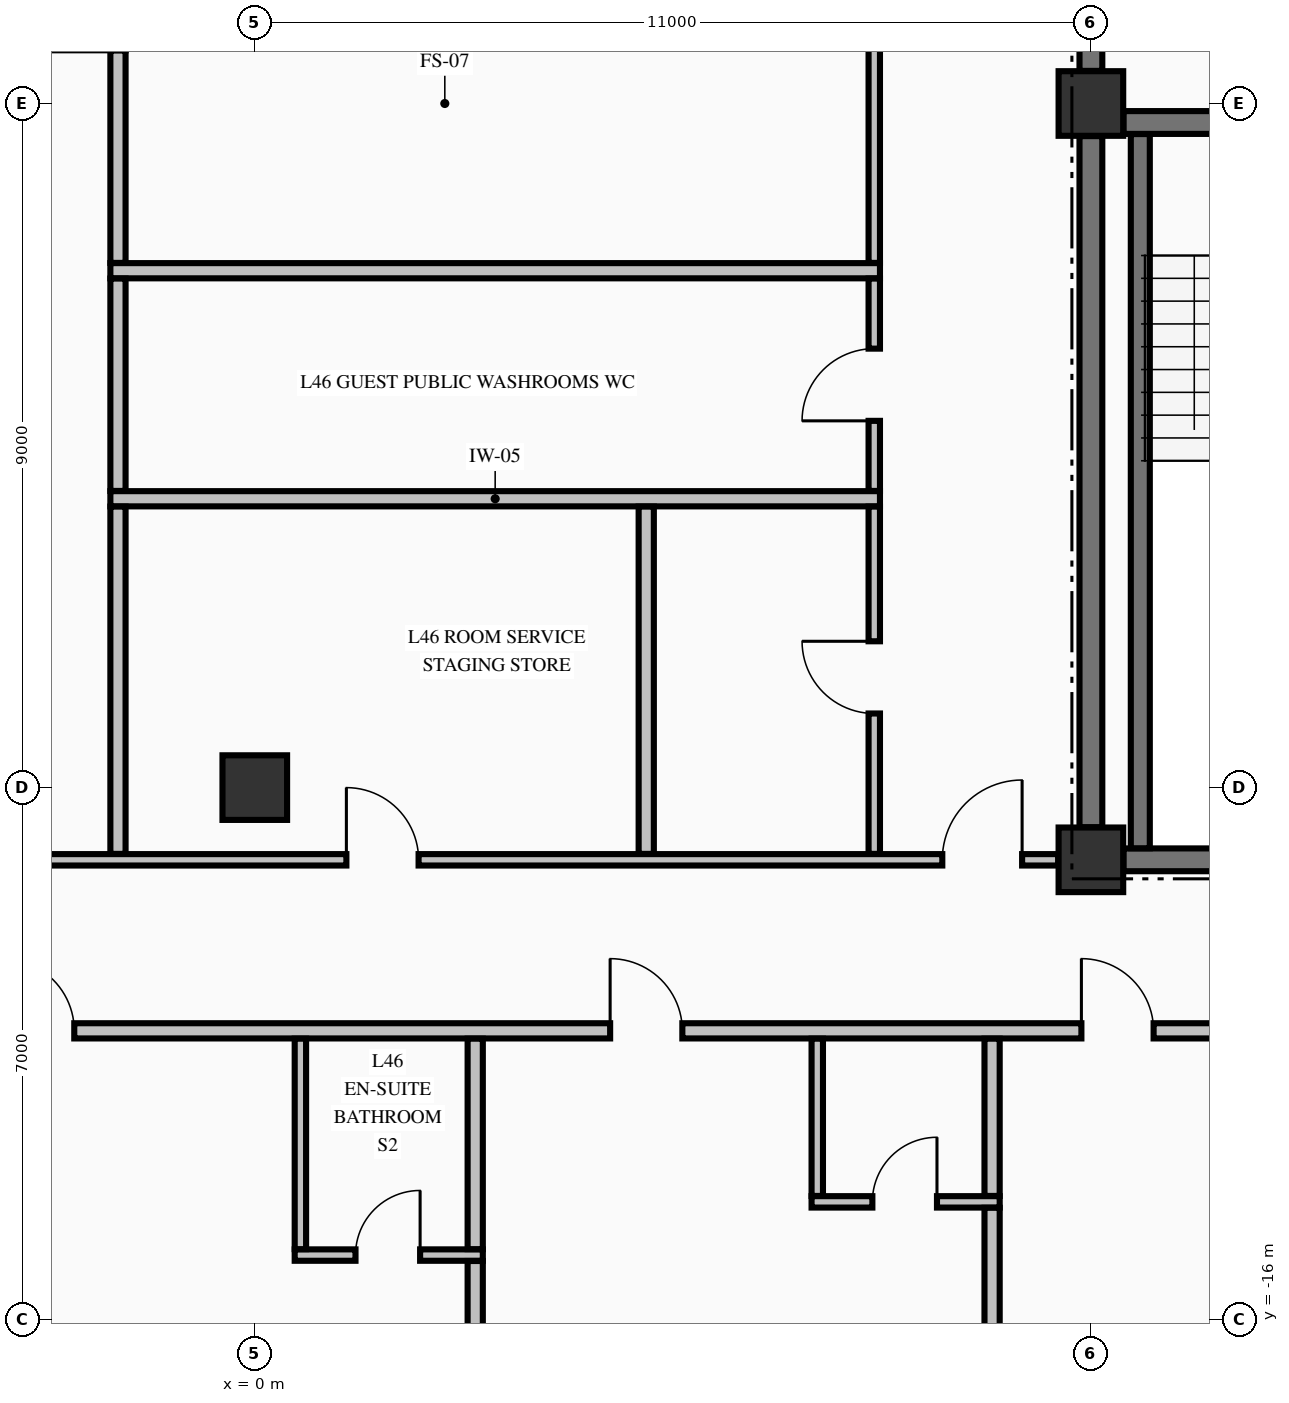
"""IFC4 building model, lengths in metres.
Left out: names, types, materials, properties, quantities, classifications, styles, units other than length and angle.
Written with IfcOpenShell. Run it as: python <this file> out.ifc"""

import sys

from ifc_helpers import new_model, si_unit, direction, frame, frame_2d, origin, origin_2d, place, context, subcontext, project, spatial, rectangle, extrude, element, fill, save


model = new_model("IFC4")
c1 = context("Model", 3, precision=1e-05, world=origin(), true_north=direction((0.0, 1.0)))
c2 = subcontext(c1, "Body", "Model", "MODEL_VIEW")
j1 = project(units=[si_unit("LENGTHUNIT", "METRE"), si_unit("PLANEANGLEUNIT", "RADIAN")], contexts=[c1])
p1 = place(None, origin())
s1 = spatial("IfcSite", under=j1, at=p1, CompositionType="ELEMENT")
p2 = place(p1, origin())
s2 = spatial("IfcBuilding", under=s1, at=p2, CompositionType="ELEMENT")
p3 = place(p2, frame((0.0, 0.0, 179.66)))
s3 = spatial("IfcBuildingStorey", under=s2, at=p3, CompositionType="ELEMENT", Elevation=179.66)
for number, where, z_axis, x_axis in (
    (1, (11.0, -9.95, -0.25), (0.0, 0.0, 1.0), (1.0, 0.0, 0.0)),
    (2, (11.0, 0.0, -0.25), (0.0, 0.0, 1.0), (1.0, 0.0, 0.0)),
    (3, (0.0, -9.0, -0.25), (0.0, 0.0, 1.0), (1.0, 0.0, 0.0)),
):
    element("IfcColumn", number, at=place(p3, frame(where, z_axis=z_axis, x_axis=x_axis)), inside=s3, PredefinedType="COLUMN", context=c2, shape_type="SweptSolid", body=[
        extrude(rectangle(XDim=0.85, YDim=0.85, at=origin_2d()), origin(), (0.0, 0.0, 1.0), 3.4),
    ])
p4 = place(p3, frame((11.429, -9.95, 0.0), z_axis=(0.0, 0.0, 1.0), x_axis=(1.0, 0.0, 0.0)))
e4 = element("IfcWall", 4, at=p4, inside=s3, PredefinedType="SHEAR", context=c2, shape_type="SweptSolid", body=[
    extrude(rectangle(XDim=3.271, YDim=0.3, at=frame_2d((1.635, 0.0))), origin(), (0.0, 0.0, 1.0), 3.15),
])
p5 = place(p3, frame((11.429, -0.25, 0.0), z_axis=(0.0, 0.0, 1.0), x_axis=(1.0, 0.0, 0.0)))
e5 = element("IfcWall", 5, at=p5, inside=s3, PredefinedType="SHEAR", context=c2, shape_type="SweptSolid", body=[
    extrude(rectangle(XDim=3.446, YDim=0.3, at=frame_2d((1.723, 0.0))), origin(), (0.0, 0.0, 1.0), 3.15),
])
p6 = place(p5, frame((1.171, 0.0, 0.0)))
e6 = element("IfcOpeningElement", 6, at=p6, cuts=e5, PredefinedType="OPENING", context=c2, shape_type="SweptSolid", body=[
    extrude(rectangle(XDim=1.1, YDim=2.15, at=frame_2d((0.55, 1.075))), frame((0.0, 0.16, 0.0), z_axis=(0.0, -1.0, 0.0), x_axis=(1.0, 0.0, 0.0)), (0.0, 0.0, 1.0), 0.32),
])
p7 = place(p3, frame((0.525, -15.15, 0.0), z_axis=(0.0, 0.0, 1.0), x_axis=(1.0, 0.0, 0.0)))
e7 = element("IfcWall", 7, at=p7, inside=s3, PredefinedType="PARTITIONING", context=c2, shape_type="SweptSolid", body=[
    extrude(rectangle(XDim=2.475, YDim=0.15, at=frame_2d((1.238, 0.0))), origin(), (0.0, 0.0, 1.0), 3.15),
])
p8 = place(p7, frame((0.8, 0.0, 0.0)))
e8 = element("IfcOpeningElement", 8, at=p8, cuts=e7, PredefinedType="OPENING", context=c2, shape_type="SweptSolid", body=[
    extrude(rectangle(XDim=0.85, YDim=2.1, at=frame_2d((0.425, 1.05))), frame((0.0, 0.085, 0.0), z_axis=(0.0, -1.0, 0.0), x_axis=(1.0, 0.0, 0.0)), (0.0, 0.0, 1.0), 0.17),
])
p9 = place(p3, frame((7.325, -14.45, 0.0), z_axis=(0.0, 0.0, 1.0), x_axis=(1.0, 0.0, 0.0)))
e9 = element("IfcWall", 9, at=p9, inside=s3, PredefinedType="PARTITIONING", context=c2, shape_type="SweptSolid", body=[
    extrude(rectangle(XDim=2.475, YDim=0.15, at=frame_2d((1.238, 0.0))), origin(), (0.0, 0.0, 1.0), 3.15),
])
p10 = place(p9, frame((0.8, 0.0, 0.0)))
e10 = element("IfcOpeningElement", 10, at=p10, cuts=e9, PredefinedType="OPENING", context=c2, shape_type="SweptSolid", body=[
    extrude(rectangle(XDim=0.85, YDim=2.1, at=frame_2d((0.425, 1.05))), frame((0.0, 0.085, 0.0), z_axis=(0.0, -1.0, 0.0), x_axis=(1.0, 0.0, 0.0)), (0.0, 0.0, 1.0), 0.17),
])
p11 = place(p3, frame((-17.1, -12.2, 0.0), z_axis=(0.0, 0.0, 1.0), x_axis=(1.0, 0.0, 0.0)))
e11 = element("IfcWall", 11, at=p11, inside=s3, PredefinedType="PARTITIONING", context=c2, shape_type="SweptSolid", body=[
    extrude(rectangle(XDim=39.2, YDim=0.2, at=frame_2d((19.6, 0.0))), origin(), (0.0, 0.0, 1.0), 3.15),
])
p12 = place(p11, frame((3.825, 0.0, 0.0)))
e12 = element("IfcOpeningElement", 12, at=p12, cuts=e11, PredefinedType="OPENING", context=c2, shape_type="SweptSolid", body=[
    extrude(rectangle(XDim=0.95, YDim=2.15, at=frame_2d((0.475, 1.075))), frame((0.0, 0.11, 0.0), z_axis=(0.0, -1.0, 0.0), x_axis=(1.0, 0.0, 0.0)), (0.0, 0.0, 1.0), 0.22),
])
p13 = place(p11, frame((13.775, 0.0, 0.0)))
e13 = element("IfcOpeningElement", 13, at=p13, cuts=e11, PredefinedType="OPENING", context=c2, shape_type="SweptSolid", body=[
    extrude(rectangle(XDim=0.95, YDim=2.15, at=frame_2d((0.475, 1.075))), frame((0.0, 0.11, 0.0), z_axis=(0.0, -1.0, 0.0), x_axis=(1.0, 0.0, 0.0)), (0.0, 0.0, 1.0), 0.22),
])
p14 = place(p11, frame((21.775, 0.0, 0.0)))
e14 = element("IfcOpeningElement", 14, at=p14, cuts=e11, PredefinedType="OPENING", context=c2, shape_type="SweptSolid", body=[
    extrude(rectangle(XDim=0.95, YDim=2.15, at=frame_2d((0.475, 1.075))), frame((0.0, 0.11, 0.0), z_axis=(0.0, -1.0, 0.0), x_axis=(1.0, 0.0, 0.0)), (0.0, 0.0, 1.0), 0.22),
])
p15 = place(p11, frame((27.975, 0.0, 0.0)))
e15 = element("IfcOpeningElement", 15, at=p15, cuts=e11, PredefinedType="OPENING", context=c2, shape_type="SweptSolid", body=[
    extrude(rectangle(XDim=0.95, YDim=2.15, at=frame_2d((0.475, 1.075))), frame((0.0, 0.11, 0.0), z_axis=(0.0, -1.0, 0.0), x_axis=(1.0, 0.0, 0.0)), (0.0, 0.0, 1.0), 0.22),
])
p16 = place(p11, frame((34.325, 0.0, 0.0)))
e16 = element("IfcOpeningElement", 16, at=p16, cuts=e11, PredefinedType="OPENING", context=c2, shape_type="SweptSolid", body=[
    extrude(rectangle(XDim=0.95, YDim=2.15, at=frame_2d((0.475, 1.075))), frame((0.0, 0.11, 0.0), z_axis=(0.0, -1.0, 0.0), x_axis=(1.0, 0.0, 0.0)), (0.0, 0.0, 1.0), 0.22),
])
p17 = place(p3, frame((-10.569, -9.95, 0.0), z_axis=(0.0, 0.0, 1.0), x_axis=(1.0, 0.0, 0.0)))
e17 = element("IfcWall", 17, at=p17, inside=s3, PredefinedType="PARTITIONING", context=c2, shape_type="SweptSolid", body=[
    extrude(rectangle(XDim=21.138, YDim=0.15, at=frame_2d((10.569, 0.0))), origin(), (0.0, 0.0, 1.0), 3.15),
])
p18 = place(p17, frame((0.474, 0.0, 0.0)))
e18 = element("IfcOpeningElement", 18, at=p18, cuts=e17, PredefinedType="OPENING", context=c2, shape_type="SweptSolid", body=[
    extrude(rectangle(XDim=1.05, YDim=2.15, at=frame_2d((0.525, 1.075))), frame((0.0, 0.085, 0.0), z_axis=(0.0, -1.0, 0.0), x_axis=(1.0, 0.0, 0.0)), (0.0, 0.0, 1.0), 0.17),
])
p19 = place(p17, frame((19.614, 0.0, 0.0)))
e19 = element("IfcOpeningElement", 19, at=p19, cuts=e17, PredefinedType="OPENING", context=c2, shape_type="SweptSolid", body=[
    extrude(rectangle(XDim=1.05, YDim=2.15, at=frame_2d((0.525, 1.075))), frame((0.0, 0.085, 0.0), z_axis=(0.0, -1.0, 0.0), x_axis=(1.0, 0.0, 0.0)), (0.0, 0.0, 1.0), 0.17),
])
p20 = place(p17, frame((11.774, 0.0, 0.0)))
e20 = element("IfcOpeningElement", 20, at=p20, cuts=e17, PredefinedType="OPENING", context=c2, shape_type="SweptSolid", body=[
    extrude(rectangle(XDim=0.95, YDim=2.15, at=frame_2d((0.475, 1.075))), frame((0.0, 0.085, 0.0), z_axis=(0.0, -1.0, 0.0), x_axis=(1.0, 0.0, 0.0)), (0.0, 0.0, 1.0), 0.17),
])
for number, where, z_axis, x_axis in (
    (21, (-1.9, -5.2, 0.0), (0.0, 0.0, 1.0), (1.0, 0.0, 0.0)),
    (22, (-1.9, -2.2, 0.0), (0.0, 0.0, 1.0), (1.0, 0.0, 0.0)),
):
    element("IfcWall", number, at=place(p3, frame(where, z_axis=z_axis, x_axis=x_axis)), inside=s3, PredefinedType="PARTITIONING", context=c2, shape_type="SweptSolid", body=[
        extrude(rectangle(XDim=10.125, YDim=0.2, at=frame_2d((5.062, 0.0))), origin(), (0.0, 0.0, 1.0), 3.15),
    ])
p21 = place(p3, frame((11.0, -9.521, 0.0), z_axis=(0.0, 0.0, 1.0), x_axis=(0.0, 1.0, 0.0)))
e23 = element("IfcWall", 23, at=p21, inside=s3, PredefinedType="SHEAR", context=c2, shape_type="SweptSolid", body=[
    extrude(rectangle(XDim=9.092, YDim=0.3, at=frame_2d((4.546, 0.0))), origin(), (0.0, 0.0, 1.0), 3.15),
])
p22 = place(p3, frame((11.0, 0.429, 0.0), z_axis=(0.0, 0.0, 1.0), x_axis=(0.0, 1.0, 0.0)))
e24 = element("IfcWall", 24, at=p22, inside=s3, PredefinedType="SHEAR", context=c2, shape_type="SweptSolid", body=[
    extrude(rectangle(XDim=2.319, YDim=0.3, at=frame_2d((1.16, 0.0))), origin(), (0.0, 0.0, 1.0), 3.15),
])
p23 = place(p22, frame((0.671, 0.0, 0.0)))
e25 = element("IfcOpeningElement", 25, at=p23, cuts=e24, PredefinedType="OPENING", context=c2, shape_type="SweptSolid", body=[
    extrude(rectangle(XDim=1.1, YDim=2.15, at=frame_2d((0.55, 1.075))), frame((0.0, 0.16, 0.0), z_axis=(0.0, -1.0, 0.0), x_axis=(1.0, 0.0, 0.0)), (0.0, 0.0, 1.0), 0.32),
])
p24 = place(p3, frame((11.65, -9.798, 0.0), z_axis=(0.0, 0.0, 1.0), x_axis=(0.0, 1.0, 0.0)))
e26 = element("IfcWall", 26, at=p24, inside=s3, PredefinedType="SOLIDWALL", context=c2, shape_type="SweptSolid", body=[
    extrude(rectangle(XDim=9.396, YDim=0.25, at=frame_2d((4.698, 0.0))), origin(), (0.0, 0.0, 1.0), 3.15),
])
p25 = place(p3, frame((-1.8, -9.872, 0.0), z_axis=(0.0, 0.0, 1.0), x_axis=(0.0, 1.0, 0.0)))
e27 = element("IfcWall", 27, at=p25, inside=s3, PredefinedType="PARTITIONING", context=c2, shape_type="SweptSolid", body=[
    extrude(rectangle(XDim=4.569, YDim=0.2, at=frame_2d((2.285, 0.0))), origin(), (0.0, 0.0, 1.0), 3.15),
])
for number, where, z_axis, x_axis in (
    (28, (-1.8, -5.097, 0.0), (0.0, 0.0, 1.0), (0.0, 1.0, 0.0)),
    (29, (-1.8, -2.097, 0.0), (0.0, 0.0, 1.0), (0.0, 1.0, 0.0)),
):
    element("IfcWall", number, at=place(p3, frame(where, z_axis=z_axis, x_axis=x_axis)), inside=s3, PredefinedType="PARTITIONING", context=c2, shape_type="SweptSolid", body=[
        extrude(rectangle(XDim=2.794, YDim=0.2, at=frame_2d((1.397, 0.0))), origin(), (0.0, 0.0, 1.0), 3.15),
    ])
p26 = place(p3, frame((0.6, -15.072, 0.0), z_axis=(0.0, 0.0, 1.0), x_axis=(0.0, 1.0, 0.0)))
e30 = element("IfcWall", 30, at=p26, inside=s3, PredefinedType="PARTITIONING", context=c2, shape_type="SweptSolid", body=[
    extrude(rectangle(XDim=2.769, YDim=0.15, at=frame_2d((1.385, 0.0))), origin(), (0.0, 0.0, 1.0), 3.15),
])
p27 = place(p3, frame((2.9, -24.335, 0.0), z_axis=(0.0, 0.0, 1.0), x_axis=(0.0, 1.0, 0.0)))
e31 = element("IfcWall", 31, at=p27, inside=s3, PredefinedType="PARTITIONING", context=c2, shape_type="SweptSolid", body=[
    extrude(rectangle(XDim=9.107, YDim=0.2, at=frame_2d((4.553, 0.0))), origin(), (0.0, 0.0, 1.0), 3.15),
])
p28 = place(p3, frame((2.9, -15.072, 0.0), z_axis=(0.0, 0.0, 1.0), x_axis=(0.0, 1.0, 0.0)))
e32 = element("IfcWall", 32, at=p28, inside=s3, PredefinedType="PARTITIONING", context=c2, shape_type="SweptSolid", body=[
    extrude(rectangle(XDim=2.769, YDim=0.2, at=frame_2d((1.385, 0.0))), origin(), (0.0, 0.0, 1.0), 3.15),
])
p29 = place(p3, frame((5.15, -9.872, 0.0), z_axis=(0.0, 0.0, 1.0), x_axis=(0.0, 1.0, 0.0)))
e33 = element("IfcWall", 33, at=p29, inside=s3, PredefinedType="PARTITIONING", context=c2, shape_type="SweptSolid", body=[
    extrude(rectangle(XDim=4.569, YDim=0.2, at=frame_2d((2.285, 0.0))), origin(), (0.0, 0.0, 1.0), 3.15),
])
p30 = place(p3, frame((7.4, -14.372, 0.0), z_axis=(0.0, 0.0, 1.0), x_axis=(0.0, 1.0, 0.0)))
e34 = element("IfcWall", 34, at=p30, inside=s3, PredefinedType="PARTITIONING", context=c2, shape_type="SweptSolid", body=[
    extrude(rectangle(XDim=2.069, YDim=0.15, at=frame_2d((1.035, 0.0))), origin(), (0.0, 0.0, 1.0), 3.15),
])
p31 = place(p3, frame((8.15, -9.872, 0.0), z_axis=(0.0, 0.0, 1.0), x_axis=(0.0, 1.0, 0.0)))
e35 = element("IfcWall", 35, at=p31, inside=s3, PredefinedType="PARTITIONING", context=c2, shape_type="SweptSolid", body=[
    extrude(rectangle(XDim=4.569, YDim=0.15, at=frame_2d((2.285, 0.0))), origin(), (0.0, 0.0, 1.0), 3.15),
])
p32 = place(p31, frame((1.847, 0.0, 0.0)))
e36 = element("IfcOpeningElement", 36, at=p32, cuts=e35, PredefinedType="OPENING", context=c2, shape_type="SweptSolid", body=[
    extrude(rectangle(XDim=0.95, YDim=2.15, at=frame_2d((0.475, 1.075))), frame((0.0, 0.085, 0.0), z_axis=(0.0, -1.0, 0.0), x_axis=(1.0, 0.0, 0.0)), (0.0, 0.0, 1.0), 0.17),
])
p33 = place(p3, frame((8.15, -5.097, 0.0), z_axis=(0.0, 0.0, 1.0), x_axis=(0.0, 1.0, 0.0)))
e37 = element("IfcWall", 37, at=p33, inside=s3, PredefinedType="PARTITIONING", context=c2, shape_type="SweptSolid", body=[
    extrude(rectangle(XDim=2.794, YDim=0.15, at=frame_2d((1.397, 0.0))), origin(), (0.0, 0.0, 1.0), 3.15),
])
p34 = place(p33, frame((0.922, 0.0, 0.0)))
e38 = element("IfcOpeningElement", 38, at=p34, cuts=e37, PredefinedType="OPENING", context=c2, shape_type="SweptSolid", body=[
    extrude(rectangle(XDim=0.95, YDim=2.15, at=frame_2d((0.475, 1.075))), frame((0.0, 0.085, 0.0), z_axis=(0.0, -1.0, 0.0), x_axis=(1.0, 0.0, 0.0)), (0.0, 0.0, 1.0), 0.17),
])
p35 = place(p3, frame((8.15, -2.097, 0.0), z_axis=(0.0, 0.0, 1.0), x_axis=(0.0, 1.0, 0.0)))
e39 = element("IfcWall", 39, at=p35, inside=s3, PredefinedType="PARTITIONING", context=c2, shape_type="SweptSolid", body=[
    extrude(rectangle(XDim=12.519, YDim=0.15, at=frame_2d((6.26, 0.0))), origin(), (0.0, 0.0, 1.0), 3.15),
])
p36 = place(p35, frame((5.697, 0.0, 0.0)))
e40 = element("IfcOpeningElement", 40, at=p36, cuts=e39, PredefinedType="OPENING", context=c2, shape_type="SweptSolid", body=[
    extrude(rectangle(XDim=1.1, YDim=2.15, at=frame_2d((0.55, 1.075))), frame((0.0, 0.085, 0.0), z_axis=(0.0, -1.0, 0.0), x_axis=(1.0, 0.0, 0.0)), (0.0, 0.0, 1.0), 0.17),
])
p37 = place(p3, frame((9.7, -24.335, 0.0), z_axis=(0.0, 0.0, 1.0), x_axis=(0.0, 1.0, 0.0)))
e41 = element("IfcWall", 41, at=p37, inside=s3, PredefinedType="PARTITIONING", context=c2, shape_type="SweptSolid", body=[
    extrude(rectangle(XDim=9.807, YDim=0.2, at=frame_2d((4.903, 0.0))), origin(), (0.0, 0.0, 1.0), 3.15),
])
p38 = place(p3, frame((9.7, -14.372, 0.0), z_axis=(0.0, 0.0, 1.0), x_axis=(0.0, 1.0, 0.0)))
e42 = element("IfcWall", 42, at=p38, inside=s3, PredefinedType="PARTITIONING", context=c2, shape_type="SweptSolid", body=[
    extrude(rectangle(XDim=2.069, YDim=0.2, at=frame_2d((1.035, 0.0))), origin(), (0.0, 0.0, 1.0), 3.15),
])
p39 = place(p19, origin())
e43 = element("IfcDoor", 43, at=p39, inside=s3, OperationType="SINGLE_SWING_RIGHT", PredefinedType="DOOR", context=c2, shape_type="SweptSolid", body=[
    extrude(rectangle(XDim=1.05, YDim=2.15, at=frame_2d((0.525, 1.075))), frame((0.0, 0.025, 0.0), z_axis=(0.0, -1.0, 0.0), x_axis=(1.0, 0.0, 0.0)), (0.0, 0.0, 1.0), 0.05),
])
fill(e19, e43)
p40 = place(p13, origin())
e44 = element("IfcDoor", 44, at=p40, inside=s3, OperationType="SINGLE_SWING_LEFT", PredefinedType="DOOR", context=c2, shape_type="SweptSolid", body=[
    extrude(rectangle(XDim=0.95, YDim=2.15, at=frame_2d((0.475, 1.075))), frame((0.0, 0.025, 0.0), z_axis=(0.0, -1.0, 0.0), x_axis=(1.0, 0.0, 0.0)), (0.0, 0.0, 1.0), 0.05),
])
fill(e13, e44)
p41 = place(p8, origin())
e45 = element("IfcDoor", 45, at=p41, inside=s3, OperationType="SINGLE_SWING_RIGHT", PredefinedType="DOOR", context=c2, shape_type="SweptSolid", body=[
    extrude(rectangle(XDim=0.85, YDim=2.1, at=frame_2d((0.425, 1.05))), frame((0.0, 0.025, 0.0), z_axis=(0.0, -1.0, 0.0), x_axis=(1.0, 0.0, 0.0)), (0.0, 0.0, 1.0), 0.05),
])
fill(e8, e45)
p42 = place(p14, origin())
e46 = element("IfcDoor", 46, at=p42, inside=s3, OperationType="SINGLE_SWING_LEFT", PredefinedType="DOOR", context=c2, shape_type="SweptSolid", body=[
    extrude(rectangle(XDim=0.95, YDim=2.15, at=frame_2d((0.475, 1.075))), frame((0.0, 0.025, 0.0), z_axis=(0.0, -1.0, 0.0), x_axis=(1.0, 0.0, 0.0)), (0.0, 0.0, 1.0), 0.05),
])
fill(e14, e46)
p43 = place(p10, origin())
e47 = element("IfcDoor", 47, at=p43, inside=s3, OperationType="SINGLE_SWING_RIGHT", PredefinedType="DOOR", context=c2, shape_type="SweptSolid", body=[
    extrude(rectangle(XDim=0.85, YDim=2.1, at=frame_2d((0.425, 1.05))), frame((0.0, 0.025, 0.0), z_axis=(0.0, -1.0, 0.0), x_axis=(1.0, 0.0, 0.0)), (0.0, 0.0, 1.0), 0.05),
])
fill(e10, e47)
p44 = place(p15, origin())
e48 = element("IfcDoor", 48, at=p44, inside=s3, OperationType="SINGLE_SWING_LEFT", PredefinedType="DOOR", context=c2, shape_type="SweptSolid", body=[
    extrude(rectangle(XDim=0.95, YDim=2.15, at=frame_2d((0.475, 1.075))), frame((0.0, 0.025, 0.0), z_axis=(0.0, -1.0, 0.0), x_axis=(1.0, 0.0, 0.0)), (0.0, 0.0, 1.0), 0.05),
])
fill(e15, e48)
p45 = place(p34, origin())
e49 = element("IfcDoor", 49, at=p45, inside=s3, OperationType="SINGLE_SWING_LEFT", PredefinedType="DOOR", context=c2, shape_type="SweptSolid", body=[
    extrude(rectangle(XDim=0.95, YDim=2.15, at=frame_2d((0.475, 1.075))), frame((0.0, 0.025, 0.0), z_axis=(0.0, -1.0, 0.0), x_axis=(1.0, 0.0, 0.0)), (0.0, 0.0, 1.0), 0.05),
])
fill(e38, e49)
p46 = place(p32, origin())
e50 = element("IfcDoor", 50, at=p46, inside=s3, OperationType="SINGLE_SWING_RIGHT", PredefinedType="DOOR", context=c2, shape_type="SweptSolid", body=[
    extrude(rectangle(XDim=0.95, YDim=2.15, at=frame_2d((0.475, 1.075))), frame((0.0, 0.025, 0.0), z_axis=(0.0, -1.0, 0.0), x_axis=(1.0, 0.0, 0.0)), (0.0, 0.0, 1.0), 0.05),
])
fill(e36, e50)
p47 = place(p20, origin())
e51 = element("IfcDoor", 51, at=p47, inside=s3, OperationType="SINGLE_SWING_LEFT", PredefinedType="DOOR", context=c2, shape_type="SweptSolid", body=[
    extrude(rectangle(XDim=0.95, YDim=2.15, at=frame_2d((0.475, 1.075))), frame((0.0, 0.025, 0.0), z_axis=(0.0, -1.0, 0.0), x_axis=(1.0, 0.0, 0.0)), (0.0, 0.0, 1.0), 0.05),
])
fill(e20, e51)
save(model, sys.argv[1])
